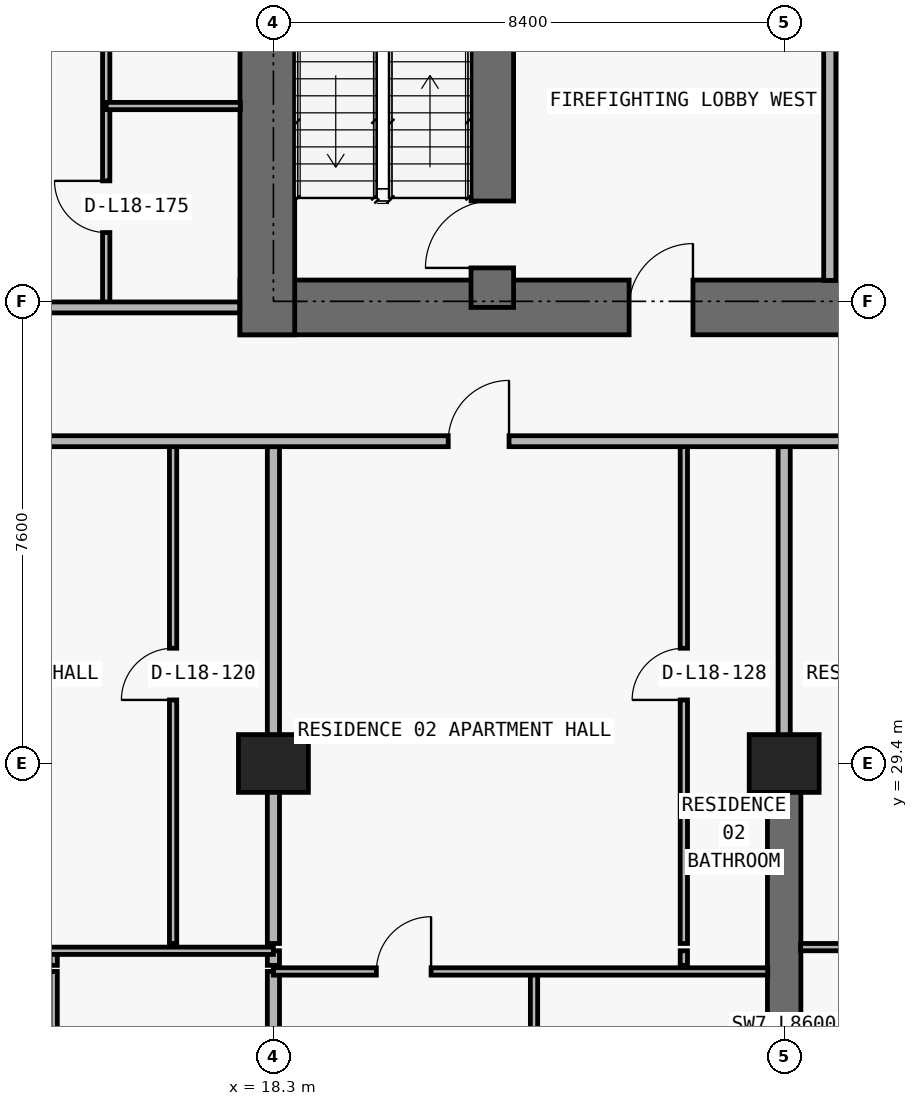
"""IFC4 building model, lengths in metres.
Left out: names, types, materials, properties, quantities, classifications, styles, units other than length and angle.
Written with IfcOpenShell. Run it as: python <this file> out.ifc"""

import sys

from ifc_helpers import new_model, si_unit, direction, frame, frame_2d, origin, origin_2d, place, context, subcontext, project, spatial, rectangle, extrude, element, fill, save


model = new_model("IFC4")
c1 = context("Model", 3, precision=1e-05, world=origin(), true_north=direction((0.0, 1.0)))
c2 = subcontext(c1, "Body", "Model", "MODEL_VIEW")
j1 = project(units=[si_unit("LENGTHUNIT", "METRE"), si_unit("PLANEANGLEUNIT", "RADIAN")], contexts=[c1])
p1 = place(None, origin())
s1 = spatial("IfcSite", under=j1, at=p1, CompositionType="ELEMENT")
p2 = place(p1, origin())
s2 = spatial("IfcBuilding", under=s1, at=p2, CompositionType="ELEMENT")
p3 = place(p2, frame((0.0, 0.0, 69.6)))
s3 = spatial("IfcBuildingStorey", under=s2, at=p3, CompositionType="ELEMENT", Elevation=69.6)
for number, where, z_axis, x_axis in (
    (1, (18.3, 29.4, 0.0), (0.0, 0.0, 1.0), (1.0, 0.0, 0.0)),
    (2, (26.7, 29.4, 0.0), (0.0, 0.0, 1.0), (1.0, 0.0, 0.0)),
):
    element("IfcColumn", number, at=place(p3, frame(where, z_axis=z_axis, x_axis=x_axis)), inside=s3, PredefinedType="COLUMN", context=c2, shape_type="SweptSolid", body=[
        extrude(rectangle(XDim=1.15, YDim=0.95, at=origin_2d()), origin(), (0.0, 0.0, 1.0), 3.05),
    ])
p4 = place(p3, frame((17.75, 36.9, 0.0), z_axis=(0.0, 0.0, 1.0), x_axis=(1.0, 0.0, 0.0)))
e3 = element("IfcWall", 3, at=p4, inside=s3, PredefinedType="SHEAR", context=c2, shape_type="SweptSolid", body=[
    extrude(rectangle(XDim=42.3, YDim=0.9, at=frame_2d((21.15, 0.0))), origin(), (0.0, 0.0, 1.0), 3.05),
])
p5 = place(p4, frame((14.55, 0.0, 0.0)))
e4 = element("IfcOpeningElement", 4, at=p5, cuts=e3, PredefinedType="OPENING", context=c2, shape_type="SweptSolid", body=[
    extrude(rectangle(XDim=1.1, YDim=2.15, at=frame_2d((0.55, 1.075))), frame((0.0, 0.46, 0.0), z_axis=(0.0, -1.0, 0.0), x_axis=(1.0, 0.0, 0.0)), (0.0, 0.0, 1.0), 0.92),
])
p6 = place(p4, frame((6.4, 0.0, 0.0)))
e5 = element("IfcOpeningElement", 5, at=p6, cuts=e3, PredefinedType="OPENING", context=c2, shape_type="SweptSolid", body=[
    extrude(rectangle(XDim=1.05, YDim=2.15, at=frame_2d((0.525, 1.075))), frame((0.0, 0.46, 0.0), z_axis=(0.0, -1.0, 0.0), x_axis=(1.0, 0.0, 0.0)), (0.0, 0.0, 1.0), 0.92),
])
p7 = place(p4, frame((34.9, 0.0, 0.0)))
e6 = element("IfcOpeningElement", 6, at=p7, cuts=e3, PredefinedType="OPENING", context=c2, shape_type="SweptSolid", body=[
    extrude(rectangle(XDim=1.05, YDim=2.15, at=frame_2d((0.525, 1.075))), frame((0.0, 0.46, 0.0), z_axis=(0.0, -1.0, 0.0), x_axis=(1.0, 0.0, 0.0)), (0.0, 0.0, 1.0), 0.92),
])
p8 = place(p4, frame((11.012, 0.0, 0.0)))
e7 = element("IfcOpeningElement", 7, at=p8, cuts=e3, PredefinedType="OPENING", context=c2, shape_type="SweptSolid", body=[
    extrude(rectangle(XDim=1.05, YDim=2.15, at=frame_2d((0.525, 1.075))), frame((0.0, 0.46, 0.0), z_axis=(0.0, -1.0, 0.0), x_axis=(1.0, 0.0, 0.0)), (0.0, 0.0, 1.0), 0.92),
])
p9 = place(p4, frame((24.25, 0.0, 0.0)))
e8 = element("IfcOpeningElement", 8, at=p9, cuts=e3, PredefinedType="OPENING", context=c2, shape_type="SweptSolid", body=[
    extrude(rectangle(XDim=1.05, YDim=2.15, at=frame_2d((0.525, 1.075))), frame((0.0, 0.46, 0.0), z_axis=(0.0, -1.0, 0.0), x_axis=(1.0, 0.0, 0.0)), (0.0, 0.0, 1.0), 0.92),
])
p10 = place(p3, frame((18.2, 36.45, 0.0), z_axis=(0.0, 0.0, 1.0), x_axis=(0.0, 1.0, 0.0)))
e9 = element("IfcWall", 9, at=p10, inside=s3, PredefinedType="SHEAR", context=c2, shape_type="SweptSolid", body=[
    extrude(rectangle(XDim=14.15, YDim=0.9, at=frame_2d((7.075, 0.0))), origin(), (0.0, 0.0, 1.0), 3.05),
])
p11 = place(p3, frame((21.9, 36.9, 0.0), z_axis=(0.0, 0.0, 1.0), x_axis=(0.0, 1.0, 0.0)))
e10 = element("IfcWall", 10, at=p11, inside=s3, PredefinedType="SHEAR", context=c2, shape_type="SweptSolid", body=[
    extrude(rectangle(XDim=9.675, YDim=0.7, at=frame_2d((4.837, 0.0))), origin(), (0.0, 0.0, 1.0), 3.05),
])
p12 = place(p11, frame((0.65, 0.0, 0.0)))
e11 = element("IfcOpeningElement", 11, at=p12, cuts=e10, PredefinedType="OPENING", context=c2, shape_type="SweptSolid", body=[
    extrude(rectangle(XDim=1.1, YDim=2.15, at=frame_2d((0.55, 1.075))), frame((0.0, 0.36, 0.0), z_axis=(0.0, -1.0, 0.0), x_axis=(1.0, 0.0, 0.0)), (0.0, 0.0, 1.0), 0.72),
])
p13 = place(p3, frame((26.7, 20.8, 0.0), z_axis=(0.0, 0.0, 1.0), x_axis=(0.0, 1.0, 0.0)))
e12 = element("IfcWall", 12, at=p13, inside=s3, PredefinedType="SHEAR", context=c2, shape_type="SweptSolid", body=[
    extrude(rectangle(XDim=8.6, YDim=0.55, at=frame_2d((4.3, 0.0))), origin(), (0.0, 0.0, 1.0), 3.05),
])
p14 = place(p3, frame((14.686, 21.29, 0.0), z_axis=(0.0, 0.0, 1.0), x_axis=(0.0, 1.0, 0.0)))
e13 = element("IfcWall", 13, at=p14, inside=s3, PredefinedType="PARTITIONING", context=c2, shape_type="SweptSolid", body=[
    extrude(rectangle(XDim=4.69, YDim=0.12, at=frame_2d((2.345, 0.0))), origin(), (0.0, 0.0, 1.0), 3.05),
])
p15 = place(p14, frame((1.895, 0.0, 0.0)))
e14 = element("IfcOpeningElement", 14, at=p15, cuts=e13, PredefinedType="OPENING", context=c2, shape_type="SweptSolid", body=[
    extrude(rectangle(XDim=0.9, YDim=2.15, at=frame_2d((0.45, 1.075))), frame((0.0, 0.07, 0.0), z_axis=(0.0, -1.0, 0.0), x_axis=(1.0, 0.0, 0.0)), (0.0, 0.0, 1.0), 0.14),
])
p16 = place(p3, frame((14.686, 26.08, 0.0), z_axis=(0.0, 0.0, 1.0), x_axis=(0.0, 1.0, 0.0)))
e15 = element("IfcWall", 15, at=p16, inside=s3, PredefinedType="PARTITIONING", context=c2, shape_type="SweptSolid", body=[
    extrude(rectangle(XDim=0.24, YDim=0.12, at=frame_2d((0.12, 0.0))), origin(), (0.0, 0.0, 1.0), 3.05),
])
p17 = place(p3, frame((15.55, 36.9, 0.0), z_axis=(0.0, 0.0, 1.0), x_axis=(0.0, 1.0, 0.0)))
e16 = element("IfcWall", 16, at=p17, inside=s3, PredefinedType="PARTITIONING", context=c2, shape_type="SweptSolid", body=[
    extrude(rectangle(XDim=6.9, YDim=0.12, at=frame_2d((3.45, 0.0))), origin(), (0.0, 0.0, 1.0), 3.05),
])
p18 = place(p17, frame((1.231, 0.0, 0.0)))
e17 = element("IfcOpeningElement", 17, at=p18, cuts=e16, PredefinedType="OPENING", context=c2, shape_type="SweptSolid", body=[
    extrude(rectangle(XDim=0.85, YDim=2.1, at=frame_2d((0.425, 1.05))), frame((0.0, 0.07, 0.0), z_axis=(0.0, -1.0, 0.0), x_axis=(1.0, 0.0, 0.0)), (0.0, 0.0, 1.0), 0.14),
])
p19 = place(p3, frame((16.65, 26.44, 0.0), z_axis=(0.0, 0.0, 1.0), x_axis=(0.0, 1.0, 0.0)))
e18 = element("IfcWall", 18, at=p19, inside=s3, PredefinedType="PARTITIONING", context=c2, shape_type="SweptSolid", body=[
    extrude(rectangle(XDim=8.26, YDim=0.12, at=frame_2d((4.13, 0.0))), origin(), (0.0, 0.0, 1.0), 3.05),
])
p20 = place(p19, frame((4.005, 0.0, 0.0)))
e19 = element("IfcOpeningElement", 19, at=p20, cuts=e18, PredefinedType="OPENING", context=c2, shape_type="SweptSolid", body=[
    extrude(rectangle(XDim=0.85, YDim=2.1, at=frame_2d((0.425, 1.05))), frame((0.0, 0.07, 0.0), z_axis=(0.0, -1.0, 0.0), x_axis=(1.0, 0.0, 0.0)), (0.0, 0.0, 1.0), 0.14),
])
p21 = place(p3, frame((18.3, 21.29, 0.0), z_axis=(0.0, 0.0, 1.0), x_axis=(0.0, 1.0, 0.0)))
e20 = element("IfcWall", 20, at=p21, inside=s3, PredefinedType="PARTITIONING", context=c2, shape_type="SweptSolid", body=[
    extrude(rectangle(XDim=4.69, YDim=0.2, at=frame_2d((2.345, 0.0))), origin(), (0.0, 0.0, 1.0), 2.11),
])
p22 = place(p3, frame((18.3, 26.08, 0.0), z_axis=(0.0, 0.0, 1.0), x_axis=(0.0, 1.0, 0.0)))
e21 = element("IfcWall", 21, at=p22, inside=s3, PredefinedType="PARTITIONING", context=c2, shape_type="SweptSolid", body=[
    extrude(rectangle(XDim=0.24, YDim=0.2, at=frame_2d((0.12, 0.0))), origin(), (0.0, 0.0, 1.0), 2.11),
])
p23 = place(p3, frame((18.3, 26.44, 0.0), z_axis=(0.0, 0.0, 1.0), x_axis=(0.0, 1.0, 0.0)))
e22 = element("IfcWall", 22, at=p23, inside=s3, PredefinedType="PARTITIONING", context=c2, shape_type="SweptSolid", body=[
    extrude(rectangle(XDim=8.26, YDim=0.2, at=frame_2d((4.13, 0.0))), origin(), (0.0, 0.0, 1.0), 2.11),
])
p24 = place(p3, frame((22.586, 21.29, 0.0), z_axis=(0.0, 0.0, 1.0), x_axis=(0.0, 1.0, 0.0)))
e23 = element("IfcWall", 23, at=p24, inside=s3, PredefinedType="PARTITIONING", context=c2, shape_type="SweptSolid", body=[
    extrude(rectangle(XDim=4.69, YDim=0.12, at=frame_2d((2.345, 0.0))), origin(), (0.0, 0.0, 1.0), 3.05),
])
p25 = place(p24, frame((1.895, 0.0, 0.0)))
e24 = element("IfcOpeningElement", 24, at=p25, cuts=e23, PredefinedType="OPENING", context=c2, shape_type="SweptSolid", body=[
    extrude(rectangle(XDim=0.9, YDim=2.15, at=frame_2d((0.45, 1.075))), frame((0.0, 0.07, 0.0), z_axis=(0.0, -1.0, 0.0), x_axis=(1.0, 0.0, 0.0)), (0.0, 0.0, 1.0), 0.14),
])
p26 = place(p3, frame((25.05, 26.08, 0.0), z_axis=(0.0, 0.0, 1.0), x_axis=(0.0, 1.0, 0.0)))
e25 = element("IfcWall", 25, at=p26, inside=s3, PredefinedType="PARTITIONING", context=c2, shape_type="SweptSolid", body=[
    extrude(rectangle(XDim=0.24, YDim=0.12, at=frame_2d((0.12, 0.0))), origin(), (0.0, 0.0, 1.0), 3.05),
])
p27 = place(p3, frame((25.05, 26.44, 0.0), z_axis=(0.0, 0.0, 1.0), x_axis=(0.0, 1.0, 0.0)))
e26 = element("IfcWall", 26, at=p27, inside=s3, PredefinedType="PARTITIONING", context=c2, shape_type="SweptSolid", body=[
    extrude(rectangle(XDim=8.26, YDim=0.12, at=frame_2d((4.13, 0.0))), origin(), (0.0, 0.0, 1.0), 3.05),
])
p28 = place(p27, frame((4.005, 0.0, 0.0)))
e27 = element("IfcOpeningElement", 27, at=p28, cuts=e26, PredefinedType="OPENING", context=c2, shape_type="SweptSolid", body=[
    extrude(rectangle(XDim=0.85, YDim=2.1, at=frame_2d((0.425, 1.05))), frame((0.0, 0.07, 0.0), z_axis=(0.0, -1.0, 0.0), x_axis=(1.0, 0.0, 0.0)), (0.0, 0.0, 1.0), 0.14),
])
p29 = place(p3, frame((26.7, 29.405, 0.0), z_axis=(0.0, 0.0, 1.0), x_axis=(0.0, 1.0, 0.0)))
e28 = element("IfcWall", 28, at=p29, inside=s3, PredefinedType="PARTITIONING", context=c2, shape_type="SweptSolid", body=[
    extrude(rectangle(XDim=5.295, YDim=0.2, at=frame_2d((2.647, 0.0))), origin(), (0.0, 0.0, 1.0), 2.335),
])
p30 = place(p3, frame((27.45, 37.345, 0.0), z_axis=(0.0, 0.0, 1.0), x_axis=(0.0, 1.0, 0.0)))
e29 = element("IfcWall", 29, at=p30, inside=s3, PredefinedType="PARTITIONING", context=c2, shape_type="SweptSolid", body=[
    extrude(rectangle(XDim=5.385, YDim=0.2, at=frame_2d((2.692, 0.0))), origin(), (0.0, 0.0, 1.0), 3.05),
])
p31 = place(p3, frame((18.3, 25.98, 0.0), z_axis=(0.0, 0.0, 1.0), x_axis=(1.0, 0.0, 0.0)))
e30 = element("IfcWall", 30, at=p31, inside=s3, PredefinedType="PARTITIONING", context=c2, shape_type="SweptSolid", body=[
    extrude(rectangle(XDim=8.13, YDim=0.12, at=frame_2d((4.065, 0.0))), origin(), (0.0, 0.0, 1.0), 3.05),
])
p32 = place(p31, frame((1.693, 0.0, 0.0)))
e31 = element("IfcOpeningElement", 31, at=p32, cuts=e30, PredefinedType="OPENING", context=c2, shape_type="SweptSolid", body=[
    extrude(rectangle(XDim=0.9, YDim=2.15, at=frame_2d((0.45, 1.075))), frame((0.0, 0.07, 0.0), z_axis=(0.0, -1.0, 0.0), x_axis=(1.0, 0.0, 0.0)), (0.0, 0.0, 1.0), 0.14),
])
p33 = place(p3, frame((9.9, 26.32, 0.0), z_axis=(0.0, 0.0, 1.0), x_axis=(1.0, 0.0, 0.0)))
e32 = element("IfcWall", 32, at=p33, inside=s3, PredefinedType="PARTITIONING", context=c2, shape_type="SweptSolid", body=[
    extrude(rectangle(XDim=8.4, YDim=0.12, at=frame_2d((4.2, 0.0))), origin(), (0.0, 0.0, 1.0), 3.05),
])
p34 = place(p33, frame((1.943, 0.0, 0.0)))
e33 = element("IfcOpeningElement", 33, at=p34, cuts=e32, PredefinedType="OPENING", context=c2, shape_type="SweptSolid", body=[
    extrude(rectangle(XDim=0.9, YDim=2.15, at=frame_2d((0.45, 1.075))), frame((0.0, 0.07, 0.0), z_axis=(0.0, -1.0, 0.0), x_axis=(1.0, 0.0, 0.0)), (0.0, 0.0, 1.0), 0.14),
])
p35 = place(p3, frame((26.97, 26.38, 0.0), z_axis=(0.0, 0.0, 1.0), x_axis=(1.0, 0.0, 0.0)))
e34 = element("IfcWall", 34, at=p35, inside=s3, PredefinedType="PARTITIONING", context=c2, shape_type="SweptSolid", body=[
    extrude(rectangle(XDim=8.13, YDim=0.12, at=frame_2d((4.065, 0.0))), origin(), (0.0, 0.0, 1.0), 3.05),
])
p36 = place(p35, frame((1.683, 0.0, 0.0)))
e35 = element("IfcOpeningElement", 35, at=p36, cuts=e34, PredefinedType="OPENING", context=c2, shape_type="SweptSolid", body=[
    extrude(rectangle(XDim=0.9, YDim=2.15, at=frame_2d((0.45, 1.075))), frame((0.0, 0.07, 0.0), z_axis=(0.0, -1.0, 0.0), x_axis=(1.0, 0.0, 0.0)), (0.0, 0.0, 1.0), 0.14),
])
p37 = place(p3, frame((5.105, 34.7, 0.0), z_axis=(0.0, 0.0, 1.0), x_axis=(1.0, 0.0, 0.0)))
e36 = element("IfcWall", 36, at=p37, inside=s3, PredefinedType="PARTITIONING", context=c2, shape_type="SweptSolid", body=[
    extrude(rectangle(XDim=67.595, YDim=0.18, at=frame_2d((33.797, 0.0))), origin(), (0.0, 0.0, 1.0), 3.05),
])
p38 = place(p37, frame((7.67, 0.0, 0.0)))
e37 = element("IfcOpeningElement", 37, at=p38, cuts=e36, PredefinedType="OPENING", context=c2, shape_type="SweptSolid", body=[
    extrude(rectangle(XDim=1.0, YDim=2.2, at=frame_2d((0.5, 1.1))), frame((0.0, 0.1, 0.0), z_axis=(0.0, -1.0, 0.0), x_axis=(1.0, 0.0, 0.0)), (0.0, 0.0, 1.0), 0.2),
])
p39 = place(p37, frame((16.07, 0.0, 0.0)))
e38 = element("IfcOpeningElement", 38, at=p39, cuts=e36, PredefinedType="OPENING", context=c2, shape_type="SweptSolid", body=[
    extrude(rectangle(XDim=1.0, YDim=2.2, at=frame_2d((0.5, 1.1))), frame((0.0, 0.1, 0.0), z_axis=(0.0, -1.0, 0.0), x_axis=(1.0, 0.0, 0.0)), (0.0, 0.0, 1.0), 0.2),
])
p40 = place(p37, frame((24.47, 0.0, 0.0)))
e39 = element("IfcOpeningElement", 39, at=p40, cuts=e36, PredefinedType="OPENING", context=c2, shape_type="SweptSolid", body=[
    extrude(rectangle(XDim=1.0, YDim=2.2, at=frame_2d((0.5, 1.1))), frame((0.0, 0.1, 0.0), z_axis=(0.0, -1.0, 0.0), x_axis=(1.0, 0.0, 0.0)), (0.0, 0.0, 1.0), 0.2),
])
p41 = place(p37, frame((32.47, 0.0, 0.0)))
e40 = element("IfcOpeningElement", 40, at=p41, cuts=e36, PredefinedType="OPENING", context=c2, shape_type="SweptSolid", body=[
    extrude(rectangle(XDim=1.0, YDim=2.2, at=frame_2d((0.5, 1.1))), frame((0.0, 0.1, 0.0), z_axis=(0.0, -1.0, 0.0), x_axis=(1.0, 0.0, 0.0)), (0.0, 0.0, 1.0), 0.2),
])
p42 = place(p37, frame((40.47, 0.0, 0.0)))
e41 = element("IfcOpeningElement", 41, at=p42, cuts=e36, PredefinedType="OPENING", context=c2, shape_type="SweptSolid", body=[
    extrude(rectangle(XDim=1.0, YDim=2.2, at=frame_2d((0.5, 1.1))), frame((0.0, 0.1, 0.0), z_axis=(0.0, -1.0, 0.0), x_axis=(1.0, 0.0, 0.0)), (0.0, 0.0, 1.0), 0.2),
])
p43 = place(p37, frame((48.87, 0.0, 0.0)))
e42 = element("IfcOpeningElement", 42, at=p43, cuts=e36, PredefinedType="OPENING", context=c2, shape_type="SweptSolid", body=[
    extrude(rectangle(XDim=1.0, YDim=2.2, at=frame_2d((0.5, 1.1))), frame((0.0, 0.1, 0.0), z_axis=(0.0, -1.0, 0.0), x_axis=(1.0, 0.0, 0.0)), (0.0, 0.0, 1.0), 0.2),
])
p44 = place(p37, frame((57.27, 0.0, 0.0)))
e43 = element("IfcOpeningElement", 43, at=p44, cuts=e36, PredefinedType="OPENING", context=c2, shape_type="SweptSolid", body=[
    extrude(rectangle(XDim=1.0, YDim=2.2, at=frame_2d((0.5, 1.1))), frame((0.0, 0.1, 0.0), z_axis=(0.0, -1.0, 0.0), x_axis=(1.0, 0.0, 0.0)), (0.0, 0.0, 1.0), 0.2),
])
p45 = place(p3, frame((5.1, 36.9, 0.0), z_axis=(0.0, 0.0, 1.0), x_axis=(1.0, 0.0, 0.0)))
e44 = element("IfcWall", 44, at=p45, inside=s3, PredefinedType="PARTITIONING", context=c2, shape_type="SweptSolid", body=[
    extrude(rectangle(XDim=12.645, YDim=0.18, at=frame_2d((6.323, 0.0))), origin(), (0.0, 0.0, 1.0), 3.05),
])
p46 = place(p45, frame((7.125, 0.0, 0.0)))
e45 = element("IfcOpeningElement", 45, at=p46, cuts=e44, PredefinedType="OPENING", context=c2, shape_type="SweptSolid", body=[
    extrude(rectangle(XDim=1.0, YDim=2.2, at=frame_2d((0.5, 1.1))), frame((0.0, 0.1, 0.0), z_axis=(0.0, -1.0, 0.0), x_axis=(1.0, 0.0, 0.0)), (0.0, 0.0, 1.0), 0.2),
])
p47 = place(p3, frame((15.55, 40.212, 0.0), z_axis=(0.0, 0.0, 1.0), x_axis=(1.0, 0.0, 0.0)))
e46 = element("IfcWall", 46, at=p47, inside=s3, PredefinedType="PARTITIONING", context=c2, shape_type="SweptSolid", body=[
    extrude(rectangle(XDim=2.205, YDim=0.12, at=frame_2d((1.103, 0.0))), origin(), (0.0, 0.0, 1.0), 3.05),
])
p48 = place(p6, origin())
e47 = element("IfcDoor", 47, at=p48, inside=s3, OperationType="SINGLE_SWING_RIGHT", PredefinedType="DOOR", context=c2, shape_type="SweptSolid", body=[
    extrude(rectangle(XDim=1.05, YDim=2.15, at=frame_2d((0.525, 1.075))), frame((0.0, 0.025, 0.0), z_axis=(0.0, -1.0, 0.0), x_axis=(1.0, 0.0, 0.0)), (0.0, 0.0, 1.0), 0.05),
])
fill(e5, e47)
p49 = place(p12, origin())
e48 = element("IfcDoor", 48, at=p49, inside=s3, OperationType="SINGLE_SWING_LEFT", PredefinedType="DOOR", context=c2, shape_type="SweptSolid", body=[
    extrude(rectangle(XDim=1.1, YDim=2.15, at=frame_2d((0.55, 1.075))), frame((0.0, 0.025, 0.0), z_axis=(0.0, -1.0, 0.0), x_axis=(1.0, 0.0, 0.0)), (0.0, 0.0, 1.0), 0.05),
])
fill(e11, e48)
p50 = place(p20, origin())
e49 = element("IfcDoor", 49, at=p50, inside=s3, OperationType="SINGLE_SWING_LEFT", PredefinedType="DOOR", context=c2, shape_type="SweptSolid", body=[
    extrude(rectangle(XDim=0.85, YDim=2.1, at=frame_2d((0.425, 1.05))), frame((0.0, 0.025, 0.0), z_axis=(0.0, -1.0, 0.0), x_axis=(1.0, 0.0, 0.0)), (0.0, 0.0, 1.0), 0.05),
])
fill(e19, e49)
p51 = place(p39, origin())
e50 = element("IfcDoor", 50, at=p51, inside=s3, OperationType="SINGLE_SWING_RIGHT", PredefinedType="DOOR", context=c2, shape_type="SweptSolid", body=[
    extrude(rectangle(XDim=1.0, YDim=2.2, at=frame_2d((0.5, 1.1))), frame((0.0, 0.025, 0.0), z_axis=(0.0, -1.0, 0.0), x_axis=(1.0, 0.0, 0.0)), (0.0, 0.0, 1.0), 0.05),
])
fill(e38, e50)
p52 = place(p28, origin())
e51 = element("IfcDoor", 51, at=p52, inside=s3, OperationType="SINGLE_SWING_LEFT", PredefinedType="DOOR", context=c2, shape_type="SweptSolid", body=[
    extrude(rectangle(XDim=0.85, YDim=2.1, at=frame_2d((0.425, 1.05))), frame((0.0, 0.025, 0.0), z_axis=(0.0, -1.0, 0.0), x_axis=(1.0, 0.0, 0.0)), (0.0, 0.0, 1.0), 0.05),
])
fill(e27, e51)
p53 = place(p32, origin())
e52 = element("IfcDoor", 52, at=p53, inside=s3, OperationType="SINGLE_SWING_RIGHT", PredefinedType="DOOR", context=c2, shape_type="SweptSolid", body=[
    extrude(rectangle(XDim=0.9, YDim=2.15, at=frame_2d((0.45, 1.075))), frame((0.0, 0.025, 0.0), z_axis=(0.0, -1.0, 0.0), x_axis=(1.0, 0.0, 0.0)), (0.0, 0.0, 1.0), 0.05),
])
fill(e31, e52)
p54 = place(p18, origin())
e53 = element("IfcDoor", 53, at=p54, inside=s3, OperationType="SINGLE_SWING_RIGHT", PredefinedType="DOOR", context=c2, shape_type="SweptSolid", body=[
    extrude(rectangle(XDim=0.85, YDim=2.1, at=frame_2d((0.425, 1.05))), frame((0.0, 0.025, 0.0), z_axis=(0.0, -1.0, 0.0), x_axis=(1.0, 0.0, 0.0)), (0.0, 0.0, 1.0), 0.05),
])
fill(e17, e53)
save(model, sys.argv[1])
